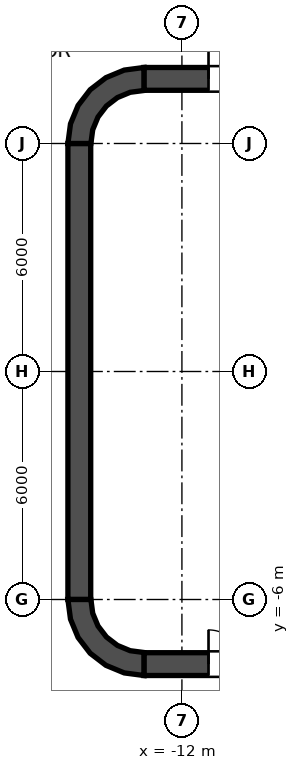
"""IFC4 building model, lengths in metres.
Left out: names, types, materials, properties, quantities, classifications, styles, units other than length and angle.
Written with IfcOpenShell. Run it as: python <this file> out.ifc"""

import sys

from ifc_helpers import new_model, si_unit, direction, frame, frame_2d, origin, place, context, subcontext, project, spatial, polyline, rectangle, outline, extrude, element, fill, save


model = new_model("IFC4")
c1 = context("Model", 3, precision=1e-05, world=origin(), true_north=direction((0.0, 1.0)))
c2 = subcontext(c1, "Body", "Model", "MODEL_VIEW")
j1 = project(units=[si_unit("LENGTHUNIT", "METRE"), si_unit("PLANEANGLEUNIT", "RADIAN")], contexts=[c1])
p1 = place(None, origin())
s1 = spatial("IfcSite", under=j1, at=p1, CompositionType="ELEMENT")
p2 = place(p1, origin())
s2 = spatial("IfcBuilding", under=s1, at=p2, CompositionType="ELEMENT")
p3 = place(p2, frame((0.0, 0.0, 102.0)))
s3 = spatial("IfcBuildingStorey", under=s2, at=p3, CompositionType="ELEMENT", Elevation=102.0)
p4 = place(p3, frame((-13.0, 7.7, 0.0), z_axis=(0.0, 0.0, 1.0), x_axis=(1.0, 0.0, 0.0)))
e1 = element("IfcWall", 1, at=p4, inside=s3, PredefinedType="SHEAR", context=c2, shape_type="SweptSolid", body=[
    extrude(rectangle(XDim=26.0, YDim=0.6, at=frame_2d((13.0, 0.0))), origin(), (0.0, 0.0, 1.0), 4.2),
])
p5 = place(p4, frame((1.7, 0.0, 0.0)))
e2 = element("IfcOpeningElement", 2, at=p5, cuts=e1, PredefinedType="OPENING", context=c2, shape_type="SweptSolid", body=[
    extrude(rectangle(XDim=1.8, YDim=2.1, at=frame_2d((0.9, 1.05))), frame((0.0, 0.3, 0.0), z_axis=(0.0, -1.0, 0.0), x_axis=(1.0, 0.0, 0.0)), (0.0, 0.0, 1.0), 0.6),
])
p6 = place(p4, frame((22.5, 0.0, 0.0)))
e3 = element("IfcOpeningElement", 3, at=p6, cuts=e1, PredefinedType="OPENING", context=c2, shape_type="SweptSolid", body=[
    extrude(rectangle(XDim=1.8, YDim=2.1, at=frame_2d((0.9, 1.05))), frame((0.0, 0.3, 0.0), z_axis=(0.0, -1.0, 0.0), x_axis=(1.0, 0.0, 0.0)), (0.0, 0.0, 1.0), 0.6),
])
p7 = place(p3, frame((-13.0, -7.7, 0.0), z_axis=(0.0, 0.0, 1.0), x_axis=(1.0, 0.0, 0.0)))
e4 = element("IfcWall", 4, at=p7, inside=s3, PredefinedType="SHEAR", context=c2, shape_type="SweptSolid", body=[
    extrude(rectangle(XDim=26.0, YDim=0.6, at=frame_2d((13.0, 0.0))), origin(), (0.0, 0.0, 1.0), 4.2),
])
p8 = place(p7, frame((1.7, 0.0, 0.0)))
e5 = element("IfcOpeningElement", 5, at=p8, cuts=e4, PredefinedType="OPENING", context=c2, shape_type="SweptSolid", body=[
    extrude(rectangle(XDim=1.8, YDim=2.1, at=frame_2d((0.9, 1.05))), frame((0.0, 0.3, 0.0), z_axis=(0.0, -1.0, 0.0), x_axis=(1.0, 0.0, 0.0)), (0.0, 0.0, 1.0), 0.6),
])
p9 = place(p7, frame((22.5, 0.0, 0.0)))
e6 = element("IfcOpeningElement", 6, at=p9, cuts=e4, PredefinedType="OPENING", context=c2, shape_type="SweptSolid", body=[
    extrude(rectangle(XDim=1.8, YDim=2.1, at=frame_2d((0.9, 1.05))), frame((0.0, 0.3, 0.0), z_axis=(0.0, -1.0, 0.0), x_axis=(1.0, 0.0, 0.0)), (0.0, 0.0, 1.0), 0.6),
])
p10 = place(p3, frame((-14.7, -6.0, 0.0), z_axis=(0.0, 0.0, 1.0), x_axis=(0.0, 1.0, 0.0)))
e7 = element("IfcWall", 7, at=p10, inside=s3, PredefinedType="SHEAR", context=c2, shape_type="SweptSolid", body=[
    extrude(rectangle(XDim=12.0, YDim=0.6, at=frame_2d((6.0, 0.0))), origin(), (0.0, 0.0, 1.0), 4.2),
])
p11 = place(p3, origin())
e8 = element("IfcWall", 8, at=p11, inside=s3, PredefinedType="SHEAR", context=c2, shape_type="SweptSolid", body=[
    extrude(outline(polyline([(-15.0, 6.0), (-14.395, 6.0), (-14.347, 6.361), (-14.208, 6.698), (-13.986, 6.986), (-13.698, 7.208), (-13.361, 7.347), (-13.0, 7.395), (-13.0, 8.0), (-13.518, 7.932), (-14.0, 7.732), (-14.414, 7.414), (-14.732, 7.0), (-14.932, 6.518), (-15.0, 6.0)])), origin(), (0.0, 0.0, 1.0), 4.2),
])
e9 = element("IfcWall", 9, at=p11, inside=s3, PredefinedType="SHEAR", context=c2, shape_type="SweptSolid", body=[
    extrude(outline(polyline([(-13.0, -8.0), (-13.0, -7.395), (-13.361, -7.347), (-13.698, -7.208), (-13.986, -6.986), (-14.208, -6.698), (-14.347, -6.361), (-14.395, -6.0), (-15.0, -6.0), (-14.932, -6.518), (-14.732, -7.0), (-14.414, -7.414), (-14.0, -7.732), (-13.518, -7.932), (-13.0, -8.0)])), origin(), (0.0, 0.0, 1.0), 4.2),
])
p12 = place(p3, frame((-11.8, -7.4, 0.0), z_axis=(0.0, 0.0, 1.0), x_axis=(0.0, 1.0, 0.0)))
e10 = element("IfcWall", 10, at=p12, inside=s3, PredefinedType="SOLIDWALL", context=c2, shape_type="SweptSolid", body=[
    extrude(rectangle(XDim=14.8, YDim=0.4, at=frame_2d((7.4, 0.0))), origin(), (0.0, 0.0, 1.0), 4.05),
])
p13 = place(p12, frame((11.2, 0.0, 0.0)))
e11 = element("IfcOpeningElement", 11, at=p13, cuts=e10, PredefinedType="OPENING", context=c2, shape_type="SweptSolid", body=[
    extrude(rectangle(XDim=1.1, YDim=2.1, at=frame_2d((0.55, 1.05))), frame((0.0, 0.2, 0.0), z_axis=(0.0, -1.0, 0.0), x_axis=(1.0, 0.0, 0.0)), (0.0, 0.0, 1.0), 0.4),
])
p14 = place(p12, frame((8.3, 0.0, 0.0)))
e12 = element("IfcOpeningElement", 12, at=p14, cuts=e10, PredefinedType="OPENING", context=c2, shape_type="SweptSolid", body=[
    extrude(rectangle(XDim=1.1, YDim=2.1, at=frame_2d((0.55, 1.05))), frame((0.0, 0.2, 0.0), z_axis=(0.0, -1.0, 0.0), x_axis=(1.0, 0.0, 0.0)), (0.0, 0.0, 1.0), 0.4),
])
p15 = place(p12, frame((5.4, 0.0, 0.0)))
e13 = element("IfcOpeningElement", 13, at=p15, cuts=e10, PredefinedType="OPENING", context=c2, shape_type="SweptSolid", body=[
    extrude(rectangle(XDim=1.1, YDim=2.1, at=frame_2d((0.55, 1.05))), frame((0.0, 0.2, 0.0), z_axis=(0.0, -1.0, 0.0), x_axis=(1.0, 0.0, 0.0)), (0.0, 0.0, 1.0), 0.4),
])
p16 = place(p12, frame((13.552, 0.0, 0.0)))
e14 = element("IfcOpeningElement", 14, at=p16, cuts=e10, PredefinedType="OPENING", context=c2, shape_type="SweptSolid", body=[
    extrude(rectangle(XDim=0.9, YDim=2.1, at=frame_2d((0.45, 1.05))), frame((0.0, 0.2, 0.0), z_axis=(0.0, -1.0, 0.0), x_axis=(1.0, 0.0, 0.0)), (0.0, 0.0, 1.0), 0.4),
])
p17 = place(p12, frame((0.347, 0.0, 0.0)))
e15 = element("IfcOpeningElement", 15, at=p17, cuts=e10, PredefinedType="OPENING", context=c2, shape_type="SweptSolid", body=[
    extrude(rectangle(XDim=0.9, YDim=2.1, at=frame_2d((0.45, 1.05))), frame((0.0, 0.2, 0.0), z_axis=(0.0, -1.0, 0.0), x_axis=(1.0, 0.0, 0.0)), (0.0, 0.0, 1.0), 0.4),
])
e16 = element("IfcWall", 16, at=p11, inside=s3, PredefinedType="SOLIDWALL", context=c2, shape_type="SweptSolid", body=[
    extrude(outline(polyline([(-12.0, -5.925), (-12.0, -5.675), (-14.15, -5.675), (-14.15, -3.025), (-12.0, -3.025), (-12.0, -2.775), (-14.15, -2.775), (-14.15, -0.125), (-12.0, -0.125), (-12.0, 0.125), (-14.15, 0.125), (-14.15, 2.775), (-12.0, 2.775), (-12.0, 3.025), (-14.15, 3.025), (-14.15, 5.675), (-12.0, 5.675), (-12.0, 5.925), (-14.15, 5.925), (-14.4, 5.925), (-14.4, 5.675), (-14.4, 3.025), (-14.4, 2.775), (-14.4, 0.125), (-14.4, -0.125), (-14.4, -2.775), (-14.4, -3.025), (-14.4, -5.675), (-14.4, -5.925), (-14.15, -5.925), (-12.0, -5.925)])), origin(), (0.0, 0.0, 1.0), 4.05),
])
p18 = place(p13, origin())
e17 = element("IfcDoor", 17, at=p18, inside=s3, OperationType="DOUBLE_DOOR_SLIDING", PredefinedType="DOOR", context=c2, shape_type="SweptSolid", body=[
    extrude(rectangle(XDim=1.1, YDim=2.1, at=frame_2d((0.55, 1.05))), frame((0.0, 0.025, 0.0), z_axis=(0.0, -1.0, 0.0), x_axis=(1.0, 0.0, 0.0)), (0.0, 0.0, 1.0), 0.05),
])
fill(e11, e17)
p19 = place(p14, origin())
e18 = element("IfcDoor", 18, at=p19, inside=s3, OperationType="DOUBLE_DOOR_SLIDING", PredefinedType="DOOR", context=c2, shape_type="SweptSolid", body=[
    extrude(rectangle(XDim=1.1, YDim=2.1, at=frame_2d((0.55, 1.05))), frame((0.0, 0.025, 0.0), z_axis=(0.0, -1.0, 0.0), x_axis=(1.0, 0.0, 0.0)), (0.0, 0.0, 1.0), 0.05),
])
fill(e12, e18)
p20 = place(p15, origin())
e19 = element("IfcDoor", 19, at=p20, inside=s3, OperationType="DOUBLE_DOOR_SLIDING", PredefinedType="DOOR", context=c2, shape_type="SweptSolid", body=[
    extrude(rectangle(XDim=1.1, YDim=2.1, at=frame_2d((0.55, 1.05))), frame((0.0, 0.025, 0.0), z_axis=(0.0, -1.0, 0.0), x_axis=(1.0, 0.0, 0.0)), (0.0, 0.0, 1.0), 0.05),
])
fill(e13, e19)
p21 = place(p16, origin())
e20 = element("IfcDoor", 20, at=p21, inside=s3, OperationType="SINGLE_SWING_LEFT", PredefinedType="DOOR", context=c2, shape_type="SweptSolid", body=[
    extrude(rectangle(XDim=0.9, YDim=2.1, at=frame_2d((0.45, 1.05))), frame((0.0, 0.025, 0.0), z_axis=(0.0, -1.0, 0.0), x_axis=(1.0, 0.0, 0.0)), (0.0, 0.0, 1.0), 0.05),
])
fill(e14, e20)
p22 = place(p17, origin())
e21 = element("IfcDoor", 21, at=p22, inside=s3, OperationType="SINGLE_SWING_LEFT", PredefinedType="DOOR", context=c2, shape_type="SweptSolid", body=[
    extrude(rectangle(XDim=0.9, YDim=2.1, at=frame_2d((0.45, 1.05))), frame((0.0, 0.025, 0.0), z_axis=(0.0, -1.0, 0.0), x_axis=(1.0, 0.0, 0.0)), (0.0, 0.0, 1.0), 0.05),
])
fill(e15, e21)
p23 = place(p5, origin())
e22 = element("IfcDoor", 22, at=p23, inside=s3, OperationType="DOUBLE_DOOR_SINGLE_SWING", PredefinedType="DOOR", context=c2, shape_type="SweptSolid", body=[
    extrude(rectangle(XDim=1.8, YDim=2.1, at=frame_2d((0.9, 1.05))), frame((0.0, 0.025, 0.0), z_axis=(0.0, -1.0, 0.0), x_axis=(1.0, 0.0, 0.0)), (0.0, 0.0, 1.0), 0.05),
])
fill(e2, e22)
p24 = place(p8, origin())
e23 = element("IfcDoor", 23, at=p24, inside=s3, OperationType="DOUBLE_DOOR_SINGLE_SWING", PredefinedType="DOOR", context=c2, shape_type="SweptSolid", body=[
    extrude(rectangle(XDim=1.8, YDim=2.1, at=frame_2d((0.9, 1.05))), frame((0.0, 0.025, 0.0), z_axis=(0.0, -1.0, 0.0), x_axis=(1.0, 0.0, 0.0)), (0.0, 0.0, 1.0), 0.05),
])
fill(e5, e23)
save(model, sys.argv[1])
